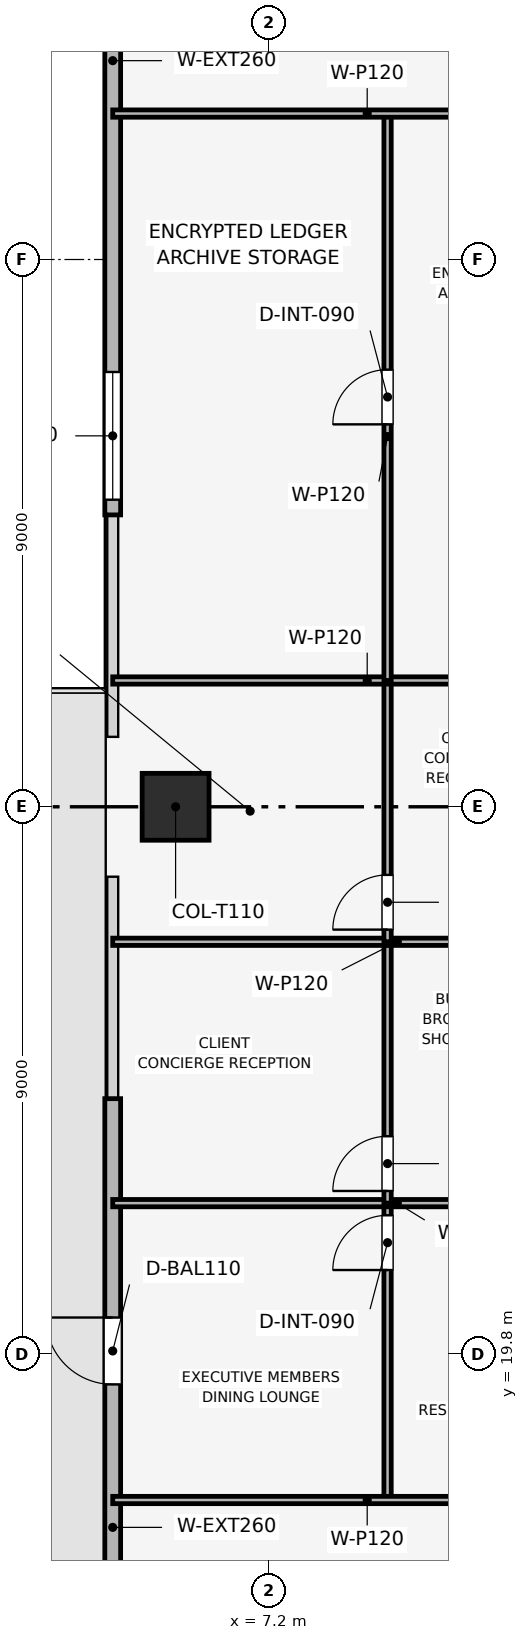
"""IFC4 building model, lengths in metres.
Left out: names, types, materials, properties, quantities, classifications, styles, units other than length and angle.
Written with IfcOpenShell. Run it as: python <this file> out.ifc"""

import sys

from ifc_helpers import new_model, si_unit, direction, frame, frame_2d, origin, origin_2d, place, context, subcontext, project, spatial, rectangle, extrude, element, fill, save


model = new_model("IFC4")
c1 = context("Model", 3, precision=1e-05, world=origin(), true_north=direction((0.0, 1.0)))
c2 = subcontext(c1, "Body", "Model", "MODEL_VIEW")
j1 = project(units=[si_unit("LENGTHUNIT", "METRE"), si_unit("PLANEANGLEUNIT", "RADIAN")], contexts=[c1])
p1 = place(None, origin())
s1 = spatial("IfcSite", under=j1, at=p1, CompositionType="ELEMENT")
p2 = place(p1, origin())
s2 = spatial("IfcBuilding", under=s1, at=p2, CompositionType="ELEMENT")
p3 = place(p2, frame((0.0, 0.0, 190.8)))
s3 = spatial("IfcBuildingStorey", under=s2, at=p3, CompositionType="ELEMENT", Elevation=190.8)
p4 = place(p3, frame((5.664, 28.8, 0.089), z_axis=(-0.371258345829, 0.0, 0.928529612157), x_axis=(0.0, -1.0, 0.0)))
e1 = element("IfcColumn", 1, at=p4, inside=s3, PredefinedType="COLUMN", context=c2, shape_type="SweptSolid", body=[
    extrude(rectangle(XDim=1.1, YDim=1.1, at=origin_2d()), origin(), (0.0, 0.0, 1.0), 3.499),
])
p5 = place(p3, frame((4.63, 11.4, 0.0), z_axis=(0.0, 0.0, 1.0), x_axis=(0.0, 1.0, 0.0)))
e2 = element("IfcWall", 2, at=p5, inside=s3, PredefinedType="SOLIDWALL", context=c2, shape_type="SweptSolid", body=[
    extrude(rectangle(XDim=12.6, YDim=0.26, at=frame_2d((6.3, 0.0))), origin(), (0.0, 0.0, 1.0), 3.35),
])
p6 = place(p5, frame((7.901, 0.0, 0.0)))
e3 = element("IfcOpeningElement", 3, at=p6, cuts=e2, PredefinedType="OPENING", context=c2, shape_type="SweptSolid", body=[
    extrude(rectangle(XDim=1.1, YDim=2.2, at=frame_2d((0.55, 1.1))), frame((0.0, 0.14, 0.0), z_axis=(0.0, -1.0, 0.0), x_axis=(1.0, 0.0, 0.0)), (0.0, 0.0, 1.0), 0.28),
])
p7 = place(p3, frame((4.63, 33.6, 0.0), z_axis=(0.0, 0.0, 1.0), x_axis=(0.0, 1.0, 0.0)))
e4 = element("IfcWall", 4, at=p7, inside=s3, PredefinedType="SOLIDWALL", context=c2, shape_type="SweptSolid", body=[
    extrude(rectangle(XDim=12.6, YDim=0.26, at=frame_2d((6.3, 0.0))), origin(), (0.0, 0.0, 1.0), 3.35),
])
p8 = place(p7, frame((0.25, 0.0, 0.72)))
e5 = element("IfcOpeningElement", 5, at=p8, cuts=e4, PredefinedType="OPENING", context=c2, shape_type="SweptSolid", body=[
    extrude(rectangle(XDim=2.1, YDim=2.1, at=frame_2d((1.05, 1.05))), frame((0.0, 0.14, 0.0), z_axis=(0.0, -1.0, 0.0), x_axis=(1.0, 0.0, 0.0)), (0.0, 0.0, 1.0), 0.28),
])
p9 = place(p3, frame((9.15, 17.4, 0.0), z_axis=(0.0, 0.0, 1.0), x_axis=(0.0, 1.0, 0.0)))
e6 = element("IfcWall", 6, at=p9, inside=s3, PredefinedType="PARTITIONING", context=c2, shape_type="SweptSolid", body=[
    extrude(rectangle(XDim=4.882, YDim=0.12, at=frame_2d((2.441, 0.0))), origin(), (0.0, 0.0, 1.0), 2.885),
])
p10 = place(p9, frame((3.782, 0.0, 0.0)))
e7 = element("IfcOpeningElement", 7, at=p10, cuts=e6, PredefinedType="OPENING", context=c2, shape_type="SweptSolid", body=[
    extrude(rectangle(XDim=0.9, YDim=2.1, at=frame_2d((0.45, 1.05))), frame((0.0, 0.07, 0.0), z_axis=(0.0, -1.0, 0.0), x_axis=(1.0, 0.0, 0.0)), (0.0, 0.0, 1.0), 0.14),
])
p11 = place(p3, frame((4.63, 22.282, 0.0), z_axis=(0.0, 0.0, 1.0), x_axis=(1.0, 0.0, 0.0)))
e8 = element("IfcWall", 8, at=p11, inside=s3, PredefinedType="PARTITIONING", context=c2, shape_type="SweptSolid", body=[
    extrude(rectangle(XDim=8.37, YDim=0.12, at=frame_2d((4.185, 0.0))), origin(), (0.0, 0.0, 1.0), 2.835),
])
p12 = place(p3, frame((9.15, 22.282, 0.0), z_axis=(0.0, 0.0, 1.0), x_axis=(0.0, 1.0, 0.0)))
e9 = element("IfcWall", 9, at=p12, inside=s3, PredefinedType="PARTITIONING", context=c2, shape_type="SweptSolid", body=[
    extrude(rectangle(XDim=4.298, YDim=0.12, at=frame_2d((2.149, 0.0))), origin(), (0.0, 0.0, 1.0), 3.35),
])
p13 = place(p12, frame((0.2, 0.0, 0.0)))
e10 = element("IfcOpeningElement", 10, at=p13, cuts=e9, PredefinedType="OPENING", context=c2, shape_type="SweptSolid", body=[
    extrude(rectangle(XDim=0.9, YDim=2.1, at=frame_2d((0.45, 1.05))), frame((0.0, 0.07, 0.0), z_axis=(0.0, -1.0, 0.0), x_axis=(1.0, 0.0, 0.0)), (0.0, 0.0, 1.0), 0.14),
])
p14 = place(p3, frame((4.63, 26.58, 0.0), z_axis=(0.0, 0.0, 1.0), x_axis=(1.0, 0.0, 0.0)))
e11 = element("IfcWall", 11, at=p14, inside=s3, PredefinedType="PARTITIONING", context=c2, shape_type="SweptSolid", body=[
    extrude(rectangle(XDim=8.37, YDim=0.12, at=frame_2d((4.185, 0.0))), origin(), (0.0, 0.0, 1.0), 2.835),
])
p15 = place(p3, frame((9.15, 26.58, 0.0), z_axis=(0.0, 0.0, 1.0), x_axis=(0.0, 1.0, 0.0)))
e12 = element("IfcWall", 12, at=p15, inside=s3, PredefinedType="PARTITIONING", context=c2, shape_type="SweptSolid", body=[
    extrude(rectangle(XDim=4.297, YDim=0.12, at=frame_2d((2.148, 0.0))), origin(), (0.0, 0.0, 1.0), 2.885),
])
p16 = place(p15, frame((0.2, 0.0, 0.0)))
e13 = element("IfcOpeningElement", 13, at=p16, cuts=e12, PredefinedType="OPENING", context=c2, shape_type="SweptSolid", body=[
    extrude(rectangle(XDim=0.9, YDim=2.1, at=frame_2d((0.45, 1.05))), frame((0.0, 0.07, 0.0), z_axis=(0.0, -1.0, 0.0), x_axis=(1.0, 0.0, 0.0)), (0.0, 0.0, 1.0), 0.14),
])
p17 = place(p3, frame((4.63, 30.877, 0.0), z_axis=(0.0, 0.0, 1.0), x_axis=(1.0, 0.0, 0.0)))
e14 = element("IfcWall", 14, at=p17, inside=s3, PredefinedType="PARTITIONING", context=c2, shape_type="SweptSolid", body=[
    extrude(rectangle(XDim=8.37, YDim=0.12, at=frame_2d((4.185, 0.0))), origin(), (0.0, 0.0, 1.0), 2.835),
])
p18 = place(p3, frame((9.15, 30.877, 0.0), z_axis=(0.0, 0.0, 1.0), x_axis=(0.0, 1.0, 0.0)))
e15 = element("IfcWall", 15, at=p18, inside=s3, PredefinedType="PARTITIONING", context=c2, shape_type="SweptSolid", body=[
    extrude(rectangle(XDim=9.323, YDim=0.12, at=frame_2d((4.662, 0.0))), origin(), (0.0, 0.0, 1.0), 2.885),
])
p19 = place(p18, frame((4.212, 0.0, 0.0)))
e16 = element("IfcOpeningElement", 16, at=p19, cuts=e15, PredefinedType="OPENING", context=c2, shape_type="SweptSolid", body=[
    extrude(rectangle(XDim=0.9, YDim=2.1, at=frame_2d((0.45, 1.05))), frame((0.0, 0.07, 0.0), z_axis=(0.0, -1.0, 0.0), x_axis=(1.0, 0.0, 0.0)), (0.0, 0.0, 1.0), 0.14),
])
for number, where, z_axis, x_axis in (
    (17, (4.63, 17.4, 0.0), (0.0, 0.0, 1.0), (1.0, 0.0, 0.0)),
    (18, (4.63, 40.2, 0.0), (0.0, 0.0, 1.0), (1.0, 0.0, 0.0)),
):
    element("IfcWall", number, at=place(p3, frame(where, z_axis=z_axis, x_axis=x_axis)), inside=s3, PredefinedType="PARTITIONING", context=c2, shape_type="SweptSolid", body=[
        extrude(rectangle(XDim=8.37, YDim=0.12, at=frame_2d((4.185, 0.0))), origin(), (0.0, 0.0, 1.0), 2.835),
    ])
p20 = place(p6, origin())
e19 = element("IfcDoor", 19, at=p20, inside=s3, OperationType="SINGLE_SWING_RIGHT", PredefinedType="DOOR", context=c2, shape_type="SweptSolid", body=[
    extrude(rectangle(XDim=1.1, YDim=2.2, at=frame_2d((0.55, 1.1))), frame((0.0, 0.025, 0.0), z_axis=(0.0, -1.0, 0.0), x_axis=(1.0, 0.0, 0.0)), (0.0, 0.0, 1.0), 0.05),
])
fill(e3, e19)
p21 = place(p8, origin())
e20 = element("IfcWindow", 20, at=p21, inside=s3, PartitioningType="SINGLE_PANEL", PredefinedType="WINDOW", context=c2, shape_type="SweptSolid", body=[
    extrude(rectangle(XDim=2.1, YDim=2.1, at=frame_2d((1.05, 1.05))), frame((0.0, 0.03, 0.0), z_axis=(0.0, -1.0, 0.0), x_axis=(1.0, 0.0, 0.0)), (0.0, 0.0, 1.0), 0.06),
])
fill(e5, e20)
p22 = place(p10, origin())
e21 = element("IfcDoor", 21, at=p22, inside=s3, OperationType="SINGLE_SWING_LEFT", PredefinedType="DOOR", context=c2, shape_type="SweptSolid", body=[
    extrude(rectangle(XDim=0.9, YDim=2.1, at=frame_2d((0.45, 1.05))), frame((0.0, 0.025, 0.0), z_axis=(0.0, -1.0, 0.0), x_axis=(1.0, 0.0, 0.0)), (0.0, 0.0, 1.0), 0.05),
])
fill(e7, e21)
p23 = place(p13, origin())
e22 = element("IfcDoor", 22, at=p23, inside=s3, OperationType="SINGLE_SWING_LEFT", PredefinedType="DOOR", context=c2, shape_type="SweptSolid", body=[
    extrude(rectangle(XDim=0.9, YDim=2.1, at=frame_2d((0.45, 1.05))), frame((0.0, 0.025, 0.0), z_axis=(0.0, -1.0, 0.0), x_axis=(1.0, 0.0, 0.0)), (0.0, 0.0, 1.0), 0.05),
])
fill(e10, e22)
p24 = place(p16, origin())
e23 = element("IfcDoor", 23, at=p24, inside=s3, OperationType="SINGLE_SWING_LEFT", PredefinedType="DOOR", context=c2, shape_type="SweptSolid", body=[
    extrude(rectangle(XDim=0.9, YDim=2.1, at=frame_2d((0.45, 1.05))), frame((0.0, 0.025, 0.0), z_axis=(0.0, -1.0, 0.0), x_axis=(1.0, 0.0, 0.0)), (0.0, 0.0, 1.0), 0.05),
])
fill(e13, e23)
p25 = place(p19, origin())
e24 = element("IfcDoor", 24, at=p25, inside=s3, OperationType="SINGLE_SWING_LEFT", PredefinedType="DOOR", context=c2, shape_type="SweptSolid", body=[
    extrude(rectangle(XDim=0.9, YDim=2.1, at=frame_2d((0.45, 1.05))), frame((0.0, 0.025, 0.0), z_axis=(0.0, -1.0, 0.0), x_axis=(1.0, 0.0, 0.0)), (0.0, 0.0, 1.0), 0.05),
])
fill(e16, e24)
save(model, sys.argv[1])
